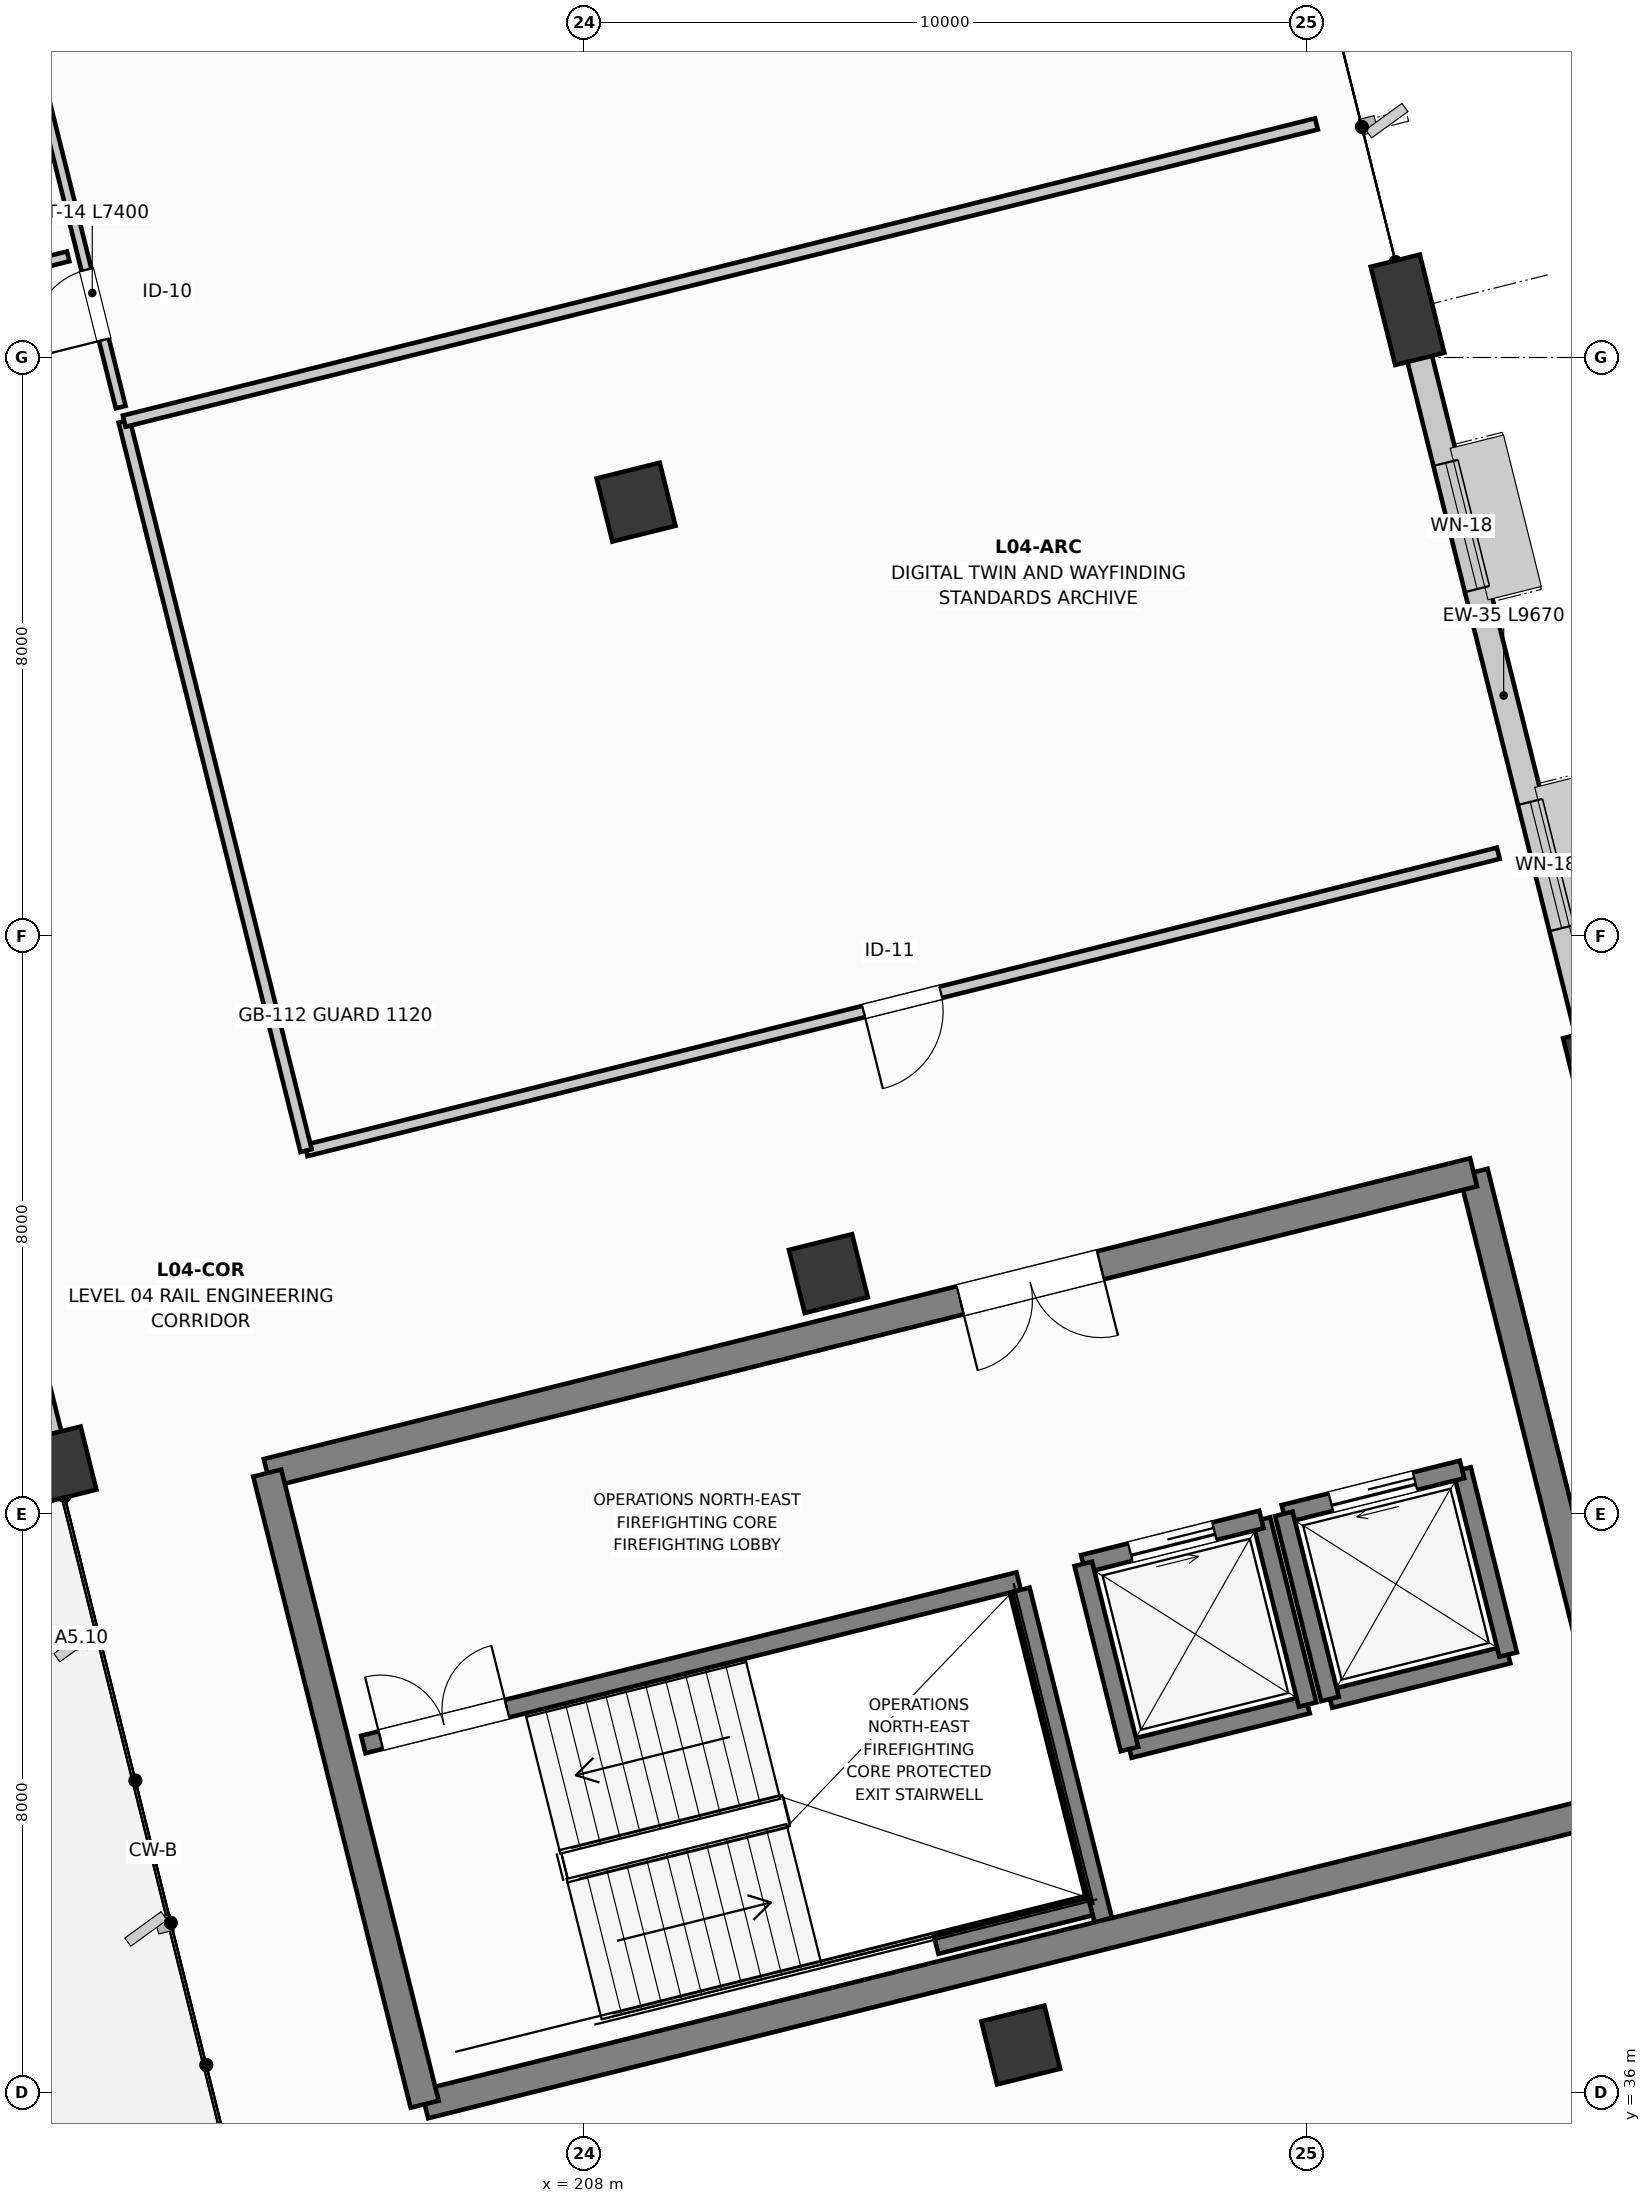
"""IFC4 building model, lengths in metres.
Left out: names, types, materials, properties, quantities, classifications, styles, units other than length and angle.
Written with IfcOpenShell. Run it as: python <this file> out.ifc"""

import sys

from ifc_helpers import new_model, si_unit, direction, frame, frame_2d, origin, origin_2d, place, context, subcontext, project, spatial, rectangle, extrude, element, fill, save


model = new_model("IFC4")
c1 = context("Model", 3, precision=1e-05, world=origin(), true_north=direction((0.0, 1.0)))
c2 = subcontext(c1, "Body", "Model", "MODEL_VIEW")
j1 = project(units=[si_unit("LENGTHUNIT", "METRE"), si_unit("PLANEANGLEUNIT", "RADIAN")], contexts=[c1])
p1 = place(None, origin())
s1 = spatial("IfcSite", under=j1, at=p1, CompositionType="ELEMENT")
p2 = place(p1, origin())
s2 = spatial("IfcBuilding", under=s1, at=p2, CompositionType="ELEMENT")
p3 = place(p2, frame((0.0, 0.0, 20.4)))
s3 = spatial("IfcBuildingStorey", under=s2, at=p3, CompositionType="ELEMENT", Elevation=20.4)
for number, where, z_axis, x_axis in (
    (1, (200.71, 44.664, 0.0), (0.0, 0.0, 1.0), (0.97, 0.242, 0.0)),
    (2, (214.044, 36.652, 0.0), (0.0, 0.0, 1.0), (0.97, 0.242, 0.0)),
    (3, (211.383, 47.325, 0.0), (0.0, 0.0, 1.0), (0.97, 0.242, 0.0)),
    (4, (208.722, 57.999, 0.0), (0.0, 0.0, 1.0), (0.97, 0.242, 0.0)),
):
    element("IfcColumn", number, at=place(p3, frame(where, z_axis=z_axis, x_axis=x_axis)), inside=s3, PredefinedType="COLUMN", context=c2, shape_type="SweptSolid", body=[
        extrude(rectangle(XDim=0.9, YDim=0.9, at=origin_2d()), origin(), (0.0, 0.0, 1.0), 4.2),
    ])
for number, where, z_axis, x_axis in (
    (5, (222.056, 49.987, 0.0), (0.0, 0.0, 1.0), (0.97, 0.242, 0.0)),
    (6, (219.395, 60.66, 0.0), (0.0, 0.0, 1.0), (0.97, 0.242, 0.0)),
):
    element("IfcColumn", number, at=place(p3, frame(where, z_axis=z_axis, x_axis=x_axis)), inside=s3, PredefinedType="COLUMN", context=c2, shape_type="SweptSolid", body=[
        extrude(rectangle(XDim=0.7, YDim=1.4, at=origin_2d()), origin(), (0.0, 0.0, 1.0), 4.2),
    ])
p4 = place(p3, frame((221.895, 50.632, 0.0), z_axis=(0.0, 0.0, 1.0), x_axis=(-0.241910213289, 0.970298638929, 0.0)))
e7 = element("IfcWall", 7, at=p4, inside=s3, PredefinedType="STANDARD", context=c2, shape_type="SweptSolid", body=[
    extrude(rectangle(XDim=9.67, YDim=0.35, at=frame_2d((4.835, 0.0))), origin(), (0.0, 0.0, 1.0), 2.795),
])
p5 = place(p4, frame((1.517, 0.0, 0.85)))
e8 = element("IfcOpeningElement", 8, at=p5, cuts=e7, PredefinedType="OPENING", context=c2, shape_type="SweptSolid", body=[
    extrude(rectangle(XDim=1.8, YDim=1.65, at=frame_2d((0.9, 0.825))), frame((0.0, 0.185, 0.0), z_axis=(0.0, -1.0, 0.0), x_axis=(1.0, 0.0, 0.0)), (0.0, 0.0, 1.0), 0.37),
])
p6 = place(p4, frame((6.352, 0.0, 0.85)))
e9 = element("IfcOpeningElement", 9, at=p6, cuts=e7, PredefinedType="OPENING", context=c2, shape_type="SweptSolid", body=[
    extrude(rectangle(XDim=1.8, YDim=1.65, at=frame_2d((0.9, 0.825))), frame((0.0, 0.185, 0.0), z_axis=(0.0, -1.0, 0.0), x_axis=(1.0, 0.0, 0.0)), (0.0, 0.0, 1.0), 0.37),
])
p7 = place(p3, frame((198.149, 54.935, 0.0), z_axis=(0.0, 0.0, 1.0), x_axis=(0.241924839684, -0.970294992228, 0.0)))
e10 = element("IfcWall", 10, at=p7, inside=s3, PredefinedType="STANDARD", context=c2, shape_type="SweptSolid", body=[
    extrude(rectangle(XDim=10.171, YDim=0.35, at=frame_2d((5.085, 0.0))), origin(), (0.0, 0.0, 1.0), 3.255),
])
p8 = place(p7, frame((4.6, 0.0, 0.0)))
e11 = element("IfcOpeningElement", 11, at=p8, cuts=e10, PredefinedType="OPENING", context=c2, shape_type="SweptSolid", body=[
    extrude(rectangle(XDim=1.8, YDim=2.3, at=frame_2d((0.9, 1.15))), frame((0.0, 0.185, 0.0), z_axis=(0.0, -1.0, 0.0), x_axis=(1.0, 0.0, 0.0)), (0.0, 0.0, 1.0), 0.37),
])
p9 = place(p3, frame((215.548, 40.748, 0.0), z_axis=(0.0, 0.0, 1.0), x_axis=(0.97029284861, 0.241933436994, 0.0)))
e12 = element("IfcWall", 12, at=p9, inside=s3, PredefinedType="SOLIDWALL", context=c2, shape_type="SweptSolid", body=[
    extrude(rectangle(XDim=2.54, YDim=0.25, at=frame_2d((1.27, 0.0))), origin(), (0.0, 0.0, 1.0), 3.88),
])
p10 = place(p3, frame((218.012, 41.362, 0.0), z_axis=(0.0, 0.0, 1.0), x_axis=(-0.241938414856, 0.970291607413, 0.0)))
e13 = element("IfcWall", 13, at=p10, inside=s3, PredefinedType="SOLIDWALL", context=c2, shape_type="SweptSolid", body=[
    extrude(rectangle(XDim=2.64, YDim=0.25, at=frame_2d((1.32, 0.0))), origin(), (0.0, 0.0, 1.0), 3.88),
])
p11 = place(p3, frame((217.374, 43.924, 0.0), z_axis=(0.0, 0.0, 1.0), x_axis=(-0.97029284861, -0.241933436994, 0.0)))
e14 = element("IfcWall", 14, at=p11, inside=s3, PredefinedType="SOLIDWALL", context=c2, shape_type="SweptSolid", body=[
    extrude(rectangle(XDim=2.54, YDim=0.25, at=frame_2d((1.27, 0.0))), origin(), (0.0, 0.0, 1.0), 3.88),
])
p12 = place(p11, frame((0.67, 0.0, 0.0)))
e15 = element("IfcOpeningElement", 15, at=p12, cuts=e14, PredefinedType="OPENING", context=c2, shape_type="SweptSolid", body=[
    extrude(rectangle(XDim=1.2, YDim=2.2, at=frame_2d((0.6, 1.1))), frame((0.0, 0.135, 0.0), z_axis=(0.0, -1.0, 0.0), x_axis=(1.0, 0.0, 0.0)), (0.0, 0.0, 1.0), 0.27),
])
p13 = place(p3, frame((214.909, 43.309, 0.0), z_axis=(0.0, 0.0, 1.0), x_axis=(0.241938414856, -0.970291607413, 0.0)))
e16 = element("IfcWall", 16, at=p13, inside=s3, PredefinedType="SOLIDWALL", context=c2, shape_type="SweptSolid", body=[
    extrude(rectangle(XDim=2.64, YDim=0.25, at=frame_2d((1.32, 0.0))), origin(), (0.0, 0.0, 1.0), 3.88),
])
p14 = place(p3, frame((218.323, 41.44, 0.0), z_axis=(0.0, 0.0, 1.0), x_axis=(0.97029284861, 0.241933436994, 0.0)))
e17 = element("IfcWall", 17, at=p14, inside=s3, PredefinedType="SOLIDWALL", context=c2, shape_type="SweptSolid", body=[
    extrude(rectangle(XDim=2.54, YDim=0.25, at=frame_2d((1.27, 0.0))), origin(), (0.0, 0.0, 1.0), 3.88),
])
p15 = place(p3, frame((220.787, 42.054, 0.0), z_axis=(0.0, 0.0, 1.0), x_axis=(-0.241938414856, 0.970291607413, 0.0)))
e18 = element("IfcWall", 18, at=p15, inside=s3, PredefinedType="SOLIDWALL", context=c2, shape_type="SweptSolid", body=[
    extrude(rectangle(XDim=2.64, YDim=0.25, at=frame_2d((1.32, 0.0))), origin(), (0.0, 0.0, 1.0), 3.88),
])
p16 = place(p3, frame((220.149, 44.616, 0.0), z_axis=(0.0, 0.0, 1.0), x_axis=(-0.97029284861, -0.241933436994, 0.0)))
e19 = element("IfcWall", 19, at=p16, inside=s3, PredefinedType="SOLIDWALL", context=c2, shape_type="SweptSolid", body=[
    extrude(rectangle(XDim=2.54, YDim=0.25, at=frame_2d((1.27, 0.0))), origin(), (0.0, 0.0, 1.0), 3.88),
])
p17 = place(p16, frame((0.67, 0.0, 0.0)))
e20 = element("IfcOpeningElement", 20, at=p17, cuts=e19, PredefinedType="OPENING", context=c2, shape_type="SweptSolid", body=[
    extrude(rectangle(XDim=1.2, YDim=2.2, at=frame_2d((0.6, 1.1))), frame((0.0, 0.135, 0.0), z_axis=(0.0, -1.0, 0.0), x_axis=(1.0, 0.0, 0.0)), (0.0, 0.0, 1.0), 0.27),
])
p18 = place(p3, frame((217.684, 44.001, 0.0), z_axis=(0.0, 0.0, 1.0), x_axis=(0.241938414856, -0.970291607413, 0.0)))
e21 = element("IfcWall", 21, at=p18, inside=s3, PredefinedType="SOLIDWALL", context=c2, shape_type="SweptSolid", body=[
    extrude(rectangle(XDim=2.64, YDim=0.25, at=frame_2d((1.32, 0.0))), origin(), (0.0, 0.0, 1.0), 3.88),
])
p19 = place(p3, frame((204.948, 40.81, 0.0), z_axis=(0.0, 0.0, 1.0), x_axis=(0.970297151331, 0.241916179943, 0.0)))
e22 = element("IfcWall", 22, at=p19, inside=s3, PredefinedType="SOLIDWALL", context=c2, shape_type="SweptSolid", body=[
    extrude(rectangle(XDim=9.345, YDim=0.25, at=frame_2d((4.673, 0.0))), origin(), (0.0, 0.0, 1.0), 3.85),
])
p20 = place(p19, frame((0.25, 0.0, 0.0)))
e23 = element("IfcOpeningElement", 23, at=p20, cuts=e22, PredefinedType="OPENING", context=c2, shape_type="SweptSolid", body=[
    extrude(rectangle(XDim=1.8, YDim=2.25, at=frame_2d((0.9, 1.125))), frame((0.0, 0.135, 0.0), z_axis=(0.0, -1.0, 0.0), x_axis=(1.0, 0.0, 0.0)), (0.0, 0.0, 1.0), 0.27),
])
p21 = place(p3, frame((215.185, 38.38, 0.0), z_axis=(0.0, 0.0, 1.0), x_axis=(-0.241911120435, 0.970298412763, 0.0)))
e24 = element("IfcWall", 24, at=p21, inside=s3, PredefinedType="SOLIDWALL", context=c2, shape_type="SweptSolid", body=[
    extrude(rectangle(XDim=4.71, YDim=0.25, at=frame_2d((2.355, 0.0))), origin(), (0.0, 0.0, 1.0), 3.85),
])
p22 = place(p3, frame((212.875, 38.035, 0.0), z_axis=(0.0, 0.0, 1.0), x_axis=(0.97029738597, 0.241915238833, 0.0)))
e25 = element("IfcWall", 25, at=p22, inside=s3, PredefinedType="SOLIDWALL", context=c2, shape_type="SweptSolid", body=[
    extrude(rectangle(XDim=2.2, YDim=0.25, at=frame_2d((1.1, 0.0))), origin(), (0.0, 0.0, 1.0), 3.85),
])
p23 = place(p3, frame((205.797, 35.833, 0.0), z_axis=(0.0, 0.0, 1.0), x_axis=(0.970295179998, 0.241924086589, 0.0)))
e26 = element("IfcWall", 26, at=p23, inside=s3, PredefinedType="SHEAR", context=c2, shape_type="SweptSolid", body=[
    extrude(rectangle(XDim=17.2, YDim=0.4, at=frame_2d((8.6, 0.0))), origin(), (0.0, 0.0, 1.0), 3.88),
])
p24 = place(p3, frame((222.486, 39.994, 0.0), z_axis=(0.0, 0.0, 1.0), x_axis=(-0.241923808098, 0.970295249435, 0.0)))
e27 = element("IfcWall", 27, at=p24, inside=s3, PredefinedType="SHEAR", context=c2, shape_type="SweptSolid", body=[
    extrude(rectangle(XDim=9.0, YDim=0.4, at=frame_2d((4.5, 0.0))), origin(), (0.0, 0.0, 1.0), 3.88),
])
p25 = place(p3, frame((220.309, 48.727, 0.0), z_axis=(0.0, 0.0, 1.0), x_axis=(-0.970296544738, -0.241918612906, 0.0)))
e28 = element("IfcWall", 28, at=p25, inside=s3, PredefinedType="SHEAR", context=c2, shape_type="SweptSolid", body=[
    extrude(rectangle(XDim=17.2, YDim=0.4, at=frame_2d((8.6, 0.0))), origin(), (0.0, 0.0, 1.0), 3.88),
])
p26 = place(p25, frame((5.32, 0.0, 0.0)))
e29 = element("IfcOpeningElement", 29, at=p26, cuts=e28, PredefinedType="OPENING", context=c2, shape_type="SweptSolid", body=[
    extrude(rectangle(XDim=2.0, YDim=2.3, at=frame_2d((1.0, 1.15))), frame((0.0, 0.21, 0.0), z_axis=(0.0, -1.0, 0.0), x_axis=(1.0, 0.0, 0.0)), (0.0, 0.0, 1.0), 0.42),
])
p27 = place(p3, frame((203.62, 44.566, 0.0), z_axis=(0.0, 0.0, 1.0), x_axis=(0.241921199913, -0.97029589973, 0.0)))
e30 = element("IfcWall", 30, at=p27, inside=s3, PredefinedType="SHEAR", context=c2, shape_type="SweptSolid", body=[
    extrude(rectangle(XDim=9.0, YDim=0.4, at=frame_2d((4.5, 0.0))), origin(), (0.0, 0.0, 1.0), 3.88),
])
p28 = place(p3, frame((220.651, 53.141, 0.0), z_axis=(0.0, 0.0, 1.0), x_axis=(-0.970295248612, -0.241923811395, 0.0)))
e31 = element("IfcWall", 31, at=p28, inside=s3, PredefinedType="PARTITIONING", context=c2, shape_type="SweptSolid", body=[
    extrude(rectangle(XDim=17.0, YDim=0.16, at=frame_2d((8.5, 0.0))), origin(), (0.0, 0.0, 1.0), 3.245),
])
p29 = place(p28, frame((7.95, 0.0, 0.0)))
e32 = element("IfcOpeningElement", 32, at=p29, cuts=e31, PredefinedType="OPENING", context=c2, shape_type="SweptSolid", body=[
    extrude(rectangle(XDim=1.1, YDim=2.2, at=frame_2d((0.55, 1.1))), frame((0.0, 0.09, 0.0), z_axis=(0.0, -1.0, 0.0), x_axis=(1.0, 0.0, 0.0)), (0.0, 0.0, 1.0), 0.18),
])
p30 = place(p3, frame((204.156, 49.028, 0.0), z_axis=(0.0, 0.0, 1.0), x_axis=(-0.241922456002, 0.970295586552, 0.0)))
e33 = element("IfcWall", 33, at=p30, inside=s3, PredefinedType="PARTITIONING", context=c2, shape_type="SweptSolid", body=[
    extrude(rectangle(XDim=10.4, YDim=0.16, at=frame_2d((5.2, 0.0))), origin(), (0.0, 0.0, 1.0), 3.245),
])
p31 = place(p3, frame((201.64, 59.119, 0.0), z_axis=(0.0, 0.0, 1.0), x_axis=(0.970296629409, 0.241918273301, 0.0)))
e34 = element("IfcWall", 34, at=p31, inside=s3, PredefinedType="PARTITIONING", context=c2, shape_type="SweptSolid", body=[
    extrude(rectangle(XDim=17.0, YDim=0.16, at=frame_2d((8.5, 0.0))), origin(), (0.0, 0.0, 1.0), 2.865),
])
p32 = place(p3, frame((201.592, 59.313, 0.0), z_axis=(0.0, 0.0, 1.0), x_axis=(-0.241918724359, 0.97029651695, 0.0)))
e35 = element("IfcWall", 35, at=p32, inside=s3, PredefinedType="PARTITIONING", context=c2, shape_type="SweptSolid", body=[
    extrude(rectangle(XDim=7.4, YDim=0.14, at=frame_2d((3.7, 0.0))), origin(), (0.0, 0.0, 1.0), 3.555),
])
p33 = place(p32, frame((0.96, 0.0, 0.0)))
e36 = element("IfcOpeningElement", 36, at=p33, cuts=e35, PredefinedType="OPENING", context=c2, shape_type="SweptSolid", body=[
    extrude(rectangle(XDim=1.0, YDim=2.15, at=frame_2d((0.5, 1.075))), frame((0.0, 0.08, 0.0), z_axis=(0.0, -1.0, 0.0), x_axis=(1.0, 0.0, 0.0)), (0.0, 0.0, 1.0), 0.16),
])
p34 = place(p3, frame((200.866, 61.399, 0.0), z_axis=(0.0, 0.0, 1.0), x_axis=(-0.970295558209, -0.241922569678, 0.0)))
e37 = element("IfcWall", 37, at=p34, inside=s3, PredefinedType="PARTITIONING", context=c2, shape_type="SweptSolid", body=[
    extrude(rectangle(XDim=3.8, YDim=0.14, at=frame_2d((1.9, 0.0))), origin(), (0.0, 0.0, 1.0), 3.88),
])
p35 = place(p34, frame((1.4, 0.0, 0.0)))
e38 = element("IfcOpeningElement", 38, at=p35, cuts=e37, PredefinedType="OPENING", context=c2, shape_type="SweptSolid", body=[
    extrude(rectangle(XDim=1.0, YDim=2.15, at=frame_2d((0.5, 1.075))), frame((0.0, 0.08, 0.0), z_axis=(0.0, -1.0, 0.0), x_axis=(1.0, 0.0, 0.0)), (0.0, 0.0, 1.0), 0.16),
])
p36 = place(p5, origin())
e39 = element("IfcWindow", 39, at=p36, inside=s3, PartitioningType="SINGLE_PANEL", PredefinedType="WINDOW", context=c2, shape_type="SweptSolid", body=[
    extrude(rectangle(XDim=1.8, YDim=1.65, at=frame_2d((0.9, 0.825))), frame((0.0, 0.03, 0.0), z_axis=(0.0, -1.0, 0.0), x_axis=(1.0, 0.0, 0.0)), (0.0, 0.0, 1.0), 0.06),
])
fill(e8, e39)
p37 = place(p6, origin())
e40 = element("IfcWindow", 40, at=p37, inside=s3, PartitioningType="SINGLE_PANEL", PredefinedType="WINDOW", context=c2, shape_type="SweptSolid", body=[
    extrude(rectangle(XDim=1.8, YDim=1.65, at=frame_2d((0.9, 0.825))), frame((0.0, 0.03, 0.0), z_axis=(0.0, -1.0, 0.0), x_axis=(1.0, 0.0, 0.0)), (0.0, 0.0, 1.0), 0.06),
])
fill(e9, e40)
p38 = place(p12, origin())
e41 = element("IfcDoor", 41, at=p38, inside=s3, OperationType="SLIDING_TO_LEFT", PredefinedType="DOOR", context=c2, shape_type="SweptSolid", body=[
    extrude(rectangle(XDim=1.2, YDim=2.2, at=frame_2d((0.6, 1.1))), frame((0.0, 0.025, 0.0), z_axis=(0.0, -1.0, 0.0), x_axis=(1.0, 0.0, 0.0)), (0.0, 0.0, 1.0), 0.05),
])
fill(e15, e41)
p39 = place(p17, origin())
e42 = element("IfcDoor", 42, at=p39, inside=s3, OperationType="SLIDING_TO_RIGHT", PredefinedType="DOOR", context=c2, shape_type="SweptSolid", body=[
    extrude(rectangle(XDim=1.2, YDim=2.2, at=frame_2d((0.6, 1.1))), frame((0.0, 0.025, 0.0), z_axis=(0.0, -1.0, 0.0), x_axis=(1.0, 0.0, 0.0)), (0.0, 0.0, 1.0), 0.05),
])
fill(e20, e42)
p40 = place(p20, origin())
e43 = element("IfcDoor", 43, at=p40, inside=s3, OperationType="DOUBLE_DOOR_SINGLE_SWING", PredefinedType="DOOR", context=c2, shape_type="SweptSolid", body=[
    extrude(rectangle(XDim=1.8, YDim=2.25, at=frame_2d((0.9, 1.125))), frame((0.0, 0.025, 0.0), z_axis=(0.0, -1.0, 0.0), x_axis=(1.0, 0.0, 0.0)), (0.0, 0.0, 1.0), 0.05),
])
fill(e23, e43)
p41 = place(p26, origin())
e44 = element("IfcDoor", 44, at=p41, inside=s3, OperationType="DOUBLE_DOOR_SINGLE_SWING", PredefinedType="DOOR", context=c2, shape_type="SweptSolid", body=[
    extrude(rectangle(XDim=2.0, YDim=2.3, at=frame_2d((1.0, 1.15))), frame((0.0, 0.025, 0.0), z_axis=(0.0, -1.0, 0.0), x_axis=(1.0, 0.0, 0.0)), (0.0, 0.0, 1.0), 0.05),
])
fill(e29, e44)
p42 = place(p29, origin())
e45 = element("IfcDoor", 45, at=p42, inside=s3, OperationType="SINGLE_SWING_RIGHT", PredefinedType="DOOR", context=c2, shape_type="SweptSolid", body=[
    extrude(rectangle(XDim=1.1, YDim=2.2, at=frame_2d((0.55, 1.1))), frame((0.0, 0.025, 0.0), z_axis=(0.0, -1.0, 0.0), x_axis=(1.0, 0.0, 0.0)), (0.0, 0.0, 1.0), 0.05),
])
fill(e32, e45)
p43 = place(p33, origin())
e46 = element("IfcDoor", 46, at=p43, inside=s3, OperationType="SINGLE_SWING_LEFT", PredefinedType="DOOR", context=c2, shape_type="SweptSolid", body=[
    extrude(rectangle(XDim=1.0, YDim=2.15, at=frame_2d((0.5, 1.075))), frame((0.0, 0.025, 0.0), z_axis=(0.0, -1.0, 0.0), x_axis=(1.0, 0.0, 0.0)), (0.0, 0.0, 1.0), 0.05),
])
fill(e36, e46)
save(model, sys.argv[1])
